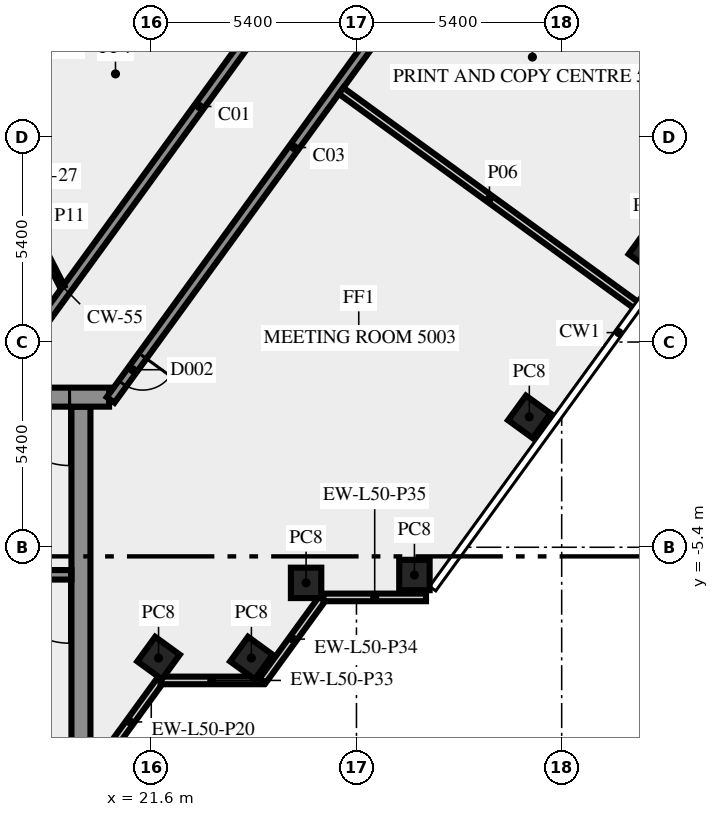
"""IFC4 building model, lengths in metres.
Left out: names, types, materials, properties, quantities, classifications, styles, units other than length and angle.
Written with IfcOpenShell. Run it as: python <this file> out.ifc"""

import sys

from ifc_helpers import new_model, si_unit, direction, frame, frame_2d, origin, origin_2d, place, context, subcontext, project, spatial, rectangle, extrude, element, fill, save


model = new_model("IFC4")
c1 = context("Model", 3, precision=1e-05, world=origin(), true_north=direction((0.0, 1.0)))
c2 = subcontext(c1, "Body", "Model", "MODEL_VIEW")
j1 = project(units=[si_unit("LENGTHUNIT", "METRE"), si_unit("PLANEANGLEUNIT", "RADIAN")], contexts=[c1])
p1 = place(None, origin())
s1 = spatial("IfcSite", under=j1, at=p1, CompositionType="ELEMENT")
p2 = place(p1, origin())
s2 = spatial("IfcBuilding", under=s1, at=p2, CompositionType="ELEMENT")
p3 = place(p2, frame((0.0, 0.0, 214.0)))
s3 = spatial("IfcBuildingStorey", under=s2, at=p3, CompositionType="ELEMENT", Elevation=214.0)
for number, where, z_axis, x_axis in (
    (1, (21.792, -8.315, 0.0), (0.0, 0.0, 1.0), (0.588, 0.809, 0.0)),
    (2, (24.235, -8.315, 0.0), (0.0, 0.0, 1.0), (0.588, 0.809, 0.0)),
    (3, (25.674, -6.337, 0.0), (0.0, 0.0, 1.0), (1.0, 0.0, 0.0)),
    (4, (28.525, -6.13, 0.0), (0.0, 0.0, 1.0), (1.0, 0.0, 0.0)),
    (5, (31.548, -1.969, 0.0), (0.0, 0.0, 1.0), (0.588, 0.809, 0.0)),
    (6, (34.722, 2.4, 0.0), (0.0, 0.0, 1.0), (0.588, 0.809, 0.0)),
):
    element("IfcColumn", number, at=place(p3, frame(where, z_axis=z_axis, x_axis=x_axis)), inside=s3, PredefinedType="COLUMN", context=c2, shape_type="SweptSolid", body=[
        extrude(rectangle(XDim=0.8, YDim=0.8, at=origin_2d()), origin(), (0.0, 0.0, 1.0), 3.65),
    ])
p4 = place(p3, frame((20.253, -11.083, 0.0), z_axis=(0.0, 0.0, 1.0), x_axis=(0.587766567315, 0.809030569476, 0.0)))
e7 = element("IfcWall", 7, at=p4, inside=s3, PredefinedType="SOLIDWALL", context=c2, shape_type="SweptSolid", body=[
    extrude(rectangle(XDim=2.688, YDim=0.2, at=frame_2d((1.344, 0.0))), origin(), (0.0, 0.0, 1.0), 3.65),
])
p5 = place(p3, frame((21.843, -8.904, 0.0), z_axis=(0.0, 0.0, 1.0), x_axis=(1.0, 0.0, 0.0)))
e8 = element("IfcWall", 8, at=p5, inside=s3, PredefinedType="SOLIDWALL", context=c2, shape_type="SweptSolid", body=[
    extrude(rectangle(XDim=2.7, YDim=0.2, at=frame_2d((1.35, 0.0))), origin(), (0.0, 0.0, 1.0), 3.65),
])
p6 = place(p3, frame((24.533, -8.909, 0.0), z_axis=(0.0, 0.0, 1.0), x_axis=(0.587720002413, 0.809064397168, 0.0)))
e9 = element("IfcWall", 9, at=p6, inside=s3, PredefinedType="SOLIDWALL", context=c2, shape_type="SweptSolid", body=[
    extrude(rectangle(XDim=2.7, YDim=0.2, at=frame_2d((1.35, 0.0))), origin(), (0.0, 0.0, 1.0), 3.65),
])
p7 = place(p3, frame((26.13, -6.719, 0.0), z_axis=(0.0, 0.0, 1.0), x_axis=(1.0, 0.0, 0.0)))
e10 = element("IfcWall", 10, at=p7, inside=s3, PredefinedType="SOLIDWALL", context=c2, shape_type="SweptSolid", body=[
    extrude(rectangle(XDim=2.7, YDim=0.2, at=frame_2d((1.35, 0.0))), origin(), (0.0, 0.0, 1.0), 3.65),
])
p8 = place(p3, frame((19.75, -10.5, 0.0), z_axis=(0.0, 0.0, 1.0), x_axis=(0.0, 1.0, 0.0)))
e11 = element("IfcWall", 11, at=p8, inside=s3, PredefinedType="SHEAR", context=c2, shape_type="SweptSolid", body=[
    extrude(rectangle(XDim=8.8, YDim=0.5, at=frame_2d((4.4, 0.0))), origin(), (0.0, 0.0, 1.0), 3.65),
])
p9 = place(p3, frame((19.5, -6.125, 0.0), z_axis=(0.0, 0.0, 1.0), x_axis=(-1.0, 0.0, 0.0)))
e12 = element("IfcWall", 12, at=p9, inside=s3, PredefinedType="SHEAR", context=c2, shape_type="SweptSolid", body=[
    extrude(rectangle(XDim=8.05, YDim=0.25, at=frame_2d((4.025, 0.0))), origin(), (0.0, 0.0, 1.0), 3.65),
])
p10 = place(p9, frame((0.05, 0.0, 0.0)))
e13 = element("IfcOpeningElement", 13, at=p10, cuts=e12, PredefinedType="OPENING", context=c2, shape_type="SweptSolid", body=[
    extrude(rectangle(XDim=1.8, YDim=2.1, at=frame_2d((0.9, 1.05))), frame((0.0, 0.135, 0.0), z_axis=(0.0, -1.0, 0.0), x_axis=(1.0, 0.0, 0.0)), (0.0, 0.0, 1.0), 0.27),
])
p11 = place(p3, frame((20.49, -1.45, 0.0), z_axis=(0.0, 0.0, 1.0), x_axis=(-1.0, 0.0, 0.0)))
e14 = element("IfcWall", 14, at=p11, inside=s3, PredefinedType="SHEAR", context=c2, shape_type="SweptSolid", body=[
    extrude(rectangle(XDim=40.98, YDim=0.5, at=frame_2d((20.49, 0.0))), origin(), (0.0, 0.0, 1.0), 3.65),
])
p12 = place(p11, frame((38.14, 0.0, 0.0)))
e15 = element("IfcOpeningElement", 15, at=p12, cuts=e14, PredefinedType="OPENING", context=c2, shape_type="SweptSolid", body=[
    extrude(rectangle(XDim=1.8, YDim=2.1, at=frame_2d((0.9, 1.05))), frame((0.0, 0.26, 0.0), z_axis=(0.0, -1.0, 0.0), x_axis=(1.0, 0.0, 0.0)), (0.0, 0.0, 1.0), 0.52),
])
p13 = place(p11, frame((36.728, 0.0, 0.0)))
e16 = element("IfcOpeningElement", 16, at=p13, cuts=e14, PredefinedType="OPENING", context=c2, shape_type="SweptSolid", body=[
    extrude(rectangle(XDim=0.8, YDim=2.1, at=frame_2d((0.4, 1.05))), frame((0.0, 0.26, 0.0), z_axis=(0.0, -1.0, 0.0), x_axis=(1.0, 0.0, 0.0)), (0.0, 0.0, 1.0), 0.52),
])
p14 = place(p11, frame((35.153, 0.0, 0.0)))
e17 = element("IfcOpeningElement", 17, at=p14, cuts=e14, PredefinedType="OPENING", context=c2, shape_type="SweptSolid", body=[
    extrude(rectangle(XDim=0.8, YDim=2.1, at=frame_2d((0.4, 1.05))), frame((0.0, 0.26, 0.0), z_axis=(0.0, -1.0, 0.0), x_axis=(1.0, 0.0, 0.0)), (0.0, 0.0, 1.0), 0.52),
])
p15 = place(p11, frame((32.94, 0.0, 0.0)))
e18 = element("IfcOpeningElement", 18, at=p15, cuts=e14, PredefinedType="OPENING", context=c2, shape_type="SweptSolid", body=[
    extrude(rectangle(XDim=0.9, YDim=2.1, at=frame_2d((0.45, 1.05))), frame((0.0, 0.26, 0.0), z_axis=(0.0, -1.0, 0.0), x_axis=(1.0, 0.0, 0.0)), (0.0, 0.0, 1.0), 0.52),
])
p16 = place(p11, frame((30.702, 0.0, 0.0)))
e19 = element("IfcOpeningElement", 19, at=p16, cuts=e14, PredefinedType="OPENING", context=c2, shape_type="SweptSolid", body=[
    extrude(rectangle(XDim=0.9, YDim=2.1, at=frame_2d((0.45, 1.05))), frame((0.0, 0.26, 0.0), z_axis=(0.0, -1.0, 0.0), x_axis=(1.0, 0.0, 0.0)), (0.0, 0.0, 1.0), 0.52),
])
p17 = place(p11, frame((28.64, 0.0, 0.0)))
e20 = element("IfcOpeningElement", 20, at=p17, cuts=e14, PredefinedType="OPENING", context=c2, shape_type="SweptSolid", body=[
    extrude(rectangle(XDim=0.9, YDim=2.1, at=frame_2d((0.45, 1.05))), frame((0.0, 0.26, 0.0), z_axis=(0.0, -1.0, 0.0), x_axis=(1.0, 0.0, 0.0)), (0.0, 0.0, 1.0), 0.52),
])
p18 = place(p11, frame((25.778, 0.0, 0.0)))
e21 = element("IfcOpeningElement", 21, at=p18, cuts=e14, PredefinedType="OPENING", context=c2, shape_type="SweptSolid", body=[
    extrude(rectangle(XDim=0.9, YDim=2.1, at=frame_2d((0.45, 1.05))), frame((0.0, 0.26, 0.0), z_axis=(0.0, -1.0, 0.0), x_axis=(1.0, 0.0, 0.0)), (0.0, 0.0, 1.0), 0.52),
])
p19 = place(p11, frame((19.59, 0.0, 0.0)))
e22 = element("IfcOpeningElement", 22, at=p19, cuts=e14, PredefinedType="OPENING", context=c2, shape_type="SweptSolid", body=[
    extrude(rectangle(XDim=2.0, YDim=2.1, at=frame_2d((1.0, 1.05))), frame((0.0, 0.26, 0.0), z_axis=(0.0, -1.0, 0.0), x_axis=(1.0, 0.0, 0.0)), (0.0, 0.0, 1.0), 0.52),
])
p20 = place(p11, frame((7.14, 0.0, 0.0)))
e23 = element("IfcOpeningElement", 23, at=p20, cuts=e14, PredefinedType="OPENING", context=c2, shape_type="SweptSolid", body=[
    extrude(rectangle(XDim=0.9, YDim=2.1, at=frame_2d((0.45, 1.05))), frame((0.0, 0.26, 0.0), z_axis=(0.0, -1.0, 0.0), x_axis=(1.0, 0.0, 0.0)), (0.0, 0.0, 1.0), 0.52),
])
p21 = place(p11, frame((4.19, 0.0, 0.0)))
e24 = element("IfcOpeningElement", 24, at=p21, cuts=e14, PredefinedType="OPENING", context=c2, shape_type="SweptSolid", body=[
    extrude(rectangle(XDim=0.9, YDim=2.1, at=frame_2d((0.45, 1.05))), frame((0.0, 0.26, 0.0), z_axis=(0.0, -1.0, 0.0), x_axis=(1.0, 0.0, 0.0)), (0.0, 0.0, 1.0), 0.52),
])
p22 = place(p11, frame((1.04, 0.0, 0.0)))
e25 = element("IfcOpeningElement", 25, at=p22, cuts=e14, PredefinedType="OPENING", context=c2, shape_type="SweptSolid", body=[
    extrude(rectangle(XDim=1.8, YDim=2.1, at=frame_2d((0.9, 1.05))), frame((0.0, 0.26, 0.0), z_axis=(0.0, -1.0, 0.0), x_axis=(1.0, 0.0, 0.0)), (0.0, 0.0, 1.0), 0.52),
])
p23 = place(p3, frame((17.545, -1.125, 0.0), z_axis=(0.0, 0.0, 1.0), x_axis=(0.58779555165, 0.809009511354, 0.0)))
e26 = element("IfcWall", 26, at=p23, inside=s3, PredefinedType="SOLIDWALL", context=c2, shape_type="SweptSolid", body=[
    extrude(rectangle(XDim=18.103, YDim=0.25, at=frame_2d((9.052, 0.0))), origin(), (0.0, 0.0, 1.0), 3.65),
])
p24 = place(p23, frame((16.728, 0.0, 0.0)))
e27 = element("IfcOpeningElement", 27, at=p24, cuts=e26, PredefinedType="OPENING", context=c2, shape_type="SweptSolid", body=[
    extrude(rectangle(XDim=0.9, YDim=2.1, at=frame_2d((0.45, 1.05))), frame((0.0, 0.135, 0.0), z_axis=(0.0, -1.0, 0.0), x_axis=(1.0, 0.0, 0.0)), (0.0, 0.0, 1.0), 0.27),
])
p25 = place(p3, frame((30.183, 11.761, 0.0), z_axis=(0.0, 0.0, 1.0), x_axis=(-0.587781762867, -0.80901952958, 0.0)))
e28 = element("IfcWall", 28, at=p25, inside=s3, PredefinedType="SOLIDWALL", context=c2, shape_type="SweptSolid", body=[
    extrude(rectangle(XDim=16.42, YDim=0.25, at=frame_2d((8.21, 0.0))), origin(), (0.0, 0.0, 1.0), 3.65),
])
p26 = place(p25, frame((14.988, 0.0, 0.0)))
e29 = element("IfcOpeningElement", 29, at=p26, cuts=e28, PredefinedType="OPENING", context=c2, shape_type="SweptSolid", body=[
    extrude(rectangle(XDim=0.9, YDim=2.1, at=frame_2d((0.45, 1.05))), frame((0.0, 0.135, 0.0), z_axis=(0.0, -1.0, 0.0), x_axis=(1.0, 0.0, 0.0)), (0.0, 0.0, 1.0), 0.27),
])
p27 = place(p25, frame((0.225, 0.0, 0.0)))
e30 = element("IfcOpeningElement", 30, at=p27, cuts=e28, PredefinedType="OPENING", context=c2, shape_type="SweptSolid", body=[
    extrude(rectangle(XDim=0.9, YDim=2.1, at=frame_2d((0.45, 1.05))), frame((0.0, 0.135, 0.0), z_axis=(0.0, -1.0, 0.0), x_axis=(1.0, 0.0, 0.0)), (0.0, 0.0, 1.0), 0.27),
])
p28 = place(p3, frame((34.403, 0.938, 0.0), z_axis=(0.0, 0.0, 1.0), x_axis=(-0.808990890476, 0.587821179549, 0.0)))
e31 = element("IfcWall", 31, at=p28, inside=s3, PredefinedType="SOLIDWALL", context=c2, shape_type="SweptSolid", body=[
    extrude(rectangle(XDim=9.651, YDim=0.2, at=frame_2d((4.826, 0.0))), origin(), (0.0, 0.0, 1.0), 2.85),
])
p29 = place(p3, frame((30.415, 11.902, 0.0), z_axis=(0.0, 0.0, 1.0), x_axis=(0.809012783133, -0.587791048526, 0.0)))
e32 = element("IfcWall", 32, at=p29, inside=s3, PredefinedType="SOLIDWALL", context=c2, shape_type="SweptSolid", body=[
    extrude(rectangle(XDim=8.62, YDim=0.2, at=frame_2d((4.31, 0.0))), origin(), (0.0, 0.0, 1.0), 3.65),
])
p30 = place(p3, frame((18.0, 3.925, 0.0), z_axis=(0.0, 0.0, 1.0), x_axis=(0.453950796792, -0.891026752736, 0.0)))
e33 = element("IfcWall", 33, at=p30, inside=s3, PredefinedType="PARTITIONING", context=c2, shape_type="SweptSolid", body=[
    extrude(rectangle(XDim=2.778, YDim=0.12, at=frame_2d((1.389, 0.0))), origin(), (0.0, 0.0, 1.0), 3.65),
])
p31 = place(p10, origin())
e34 = element("IfcDoor", 34, at=p31, inside=s3, OperationType="DOUBLE_DOOR_SINGLE_SWING", PredefinedType="DOOR", context=c2, shape_type="SweptSolid", body=[
    extrude(rectangle(XDim=1.8, YDim=2.1, at=frame_2d((0.9, 1.05))), frame((0.0, 0.025, 0.0), z_axis=(0.0, -1.0, 0.0), x_axis=(1.0, 0.0, 0.0)), (0.0, 0.0, 1.0), 0.05),
])
fill(e13, e34)
p32 = place(p22, origin())
e35 = element("IfcDoor", 35, at=p32, inside=s3, OperationType="DOUBLE_DOOR_SINGLE_SWING", PredefinedType="DOOR", context=c2, shape_type="SweptSolid", body=[
    extrude(rectangle(XDim=1.8, YDim=2.1, at=frame_2d((0.9, 1.05))), frame((0.0, 0.025, 0.0), z_axis=(0.0, -1.0, 0.0), x_axis=(1.0, 0.0, 0.0)), (0.0, 0.0, 1.0), 0.05),
])
fill(e25, e35)
p33 = place(p26, origin())
e36 = element("IfcDoor", 36, at=p33, inside=s3, OperationType="SINGLE_SWING_RIGHT", PredefinedType="DOOR", context=c2, shape_type="SweptSolid", body=[
    extrude(rectangle(XDim=0.9, YDim=2.1, at=frame_2d((0.45, 1.05))), frame((0.0, 0.025, 0.0), z_axis=(0.0, -1.0, 0.0), x_axis=(1.0, 0.0, 0.0)), (0.0, 0.0, 1.0), 0.05),
])
fill(e29, e36)
save(model, sys.argv[1])
